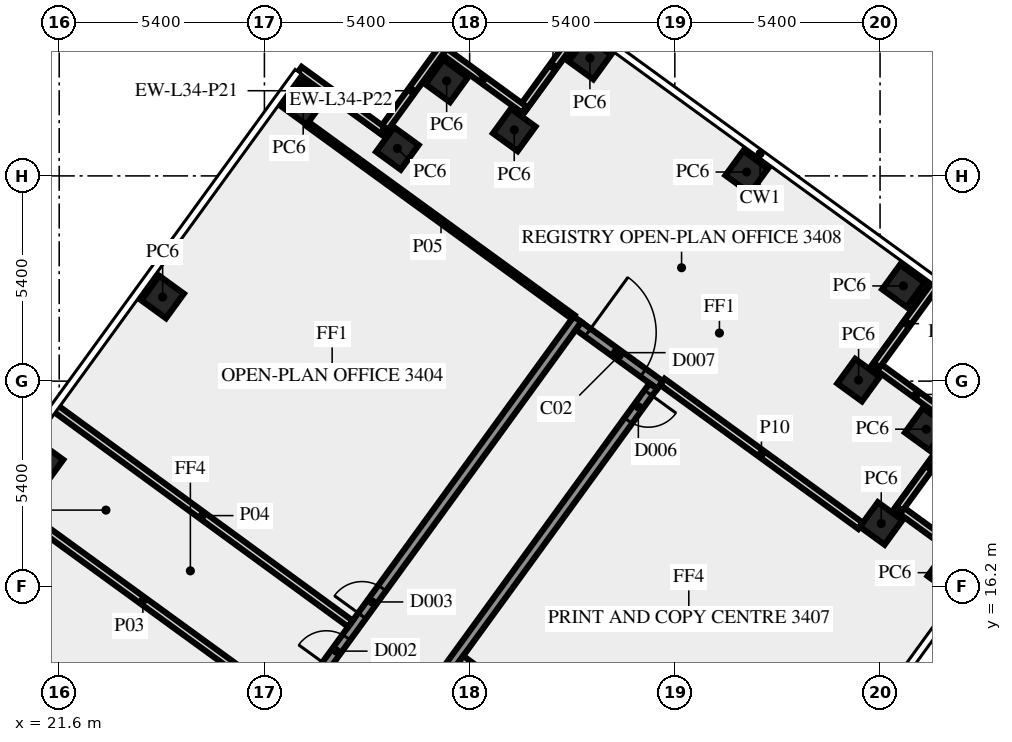
"""IFC4 building model, lengths in metres.
Left out: names, types, materials, properties, quantities, classifications, styles, units other than length and angle.
Written with IfcOpenShell. Run it as: python <this file> out.ifc"""

import sys

from ifc_helpers import new_model, si_unit, direction, frame, frame_2d, origin, origin_2d, place, context, subcontext, project, spatial, rectangle, extrude, element, fill, save


model = new_model("IFC4")
c1 = context("Model", 3, precision=1e-05, world=origin(), true_north=direction((0.0, 1.0)))
c2 = subcontext(c1, "Body", "Model", "MODEL_VIEW")
j1 = project(units=[si_unit("LENGTHUNIT", "METRE"), si_unit("PLANEANGLEUNIT", "RADIAN")], contexts=[c1])
p1 = place(None, origin())
s1 = spatial("IfcSite", under=j1, at=p1, CompositionType="ELEMENT")
p2 = place(p1, origin())
s2 = spatial("IfcBuilding", under=s1, at=p2, CompositionType="ELEMENT")
p3 = place(p2, frame((0.0, 0.0, 148.0)))
s3 = spatial("IfcBuildingStorey", under=s2, at=p3, CompositionType="ELEMENT", Elevation=148.0)
for number, where, z_axis, x_axis in (
    (1, (45.01, 16.56, 0.0), (0.0, 0.0, 1.0), (0.588, 0.809, 0.0)),
    (2, (43.231, 17.854, 0.0), (0.0, 0.0, 1.0), (0.588, 0.809, 0.0)),
    (3, (44.415, 20.335, 0.0), (0.0, 0.0, 1.0), (0.588, 0.809, 0.0)),
    (4, (42.635, 21.626, 0.0), (0.0, 0.0, 1.0), (-0.809, 0.588, 0.0)),
    (5, (43.815, 24.105, 0.0), (0.0, 0.0, 1.0), (-0.809, 0.588, 0.0)),
    (6, (39.691, 27.102, 0.0), (0.0, 0.0, 1.0), (-0.809, 0.588, 0.0)),
    (7, (35.565, 30.1, 0.0), (0.0, 0.0, 1.0), (-0.588, -0.809, 0.0)),
    (8, (33.574, 28.209, 0.0), (0.0, 0.0, 1.0), (-0.809, 0.588, 0.0)),
    (9, (31.795, 29.5, 0.0), (0.0, 0.0, 1.0), (-0.588, -0.809, 0.0)),
    (10, (30.499, 27.723, 0.0), (0.0, 0.0, 1.0), (-0.809, 0.588, 0.0)),
    (11, (28.02, 28.905, 0.0), (0.0, 0.0, 1.0), (-0.809, 0.588, 0.0)),
    (12, (24.321, 23.812, 0.0), (0.0, 0.0, 1.0), (-0.588, -0.809, 0.0)),
    (13, (21.147, 19.444, 0.0), (0.0, 0.0, 1.0), (-0.588, -0.809, 0.0)),
):
    element("IfcColumn", number, at=place(p3, frame(where, z_axis=z_axis, x_axis=x_axis)), inside=s3, PredefinedType="COLUMN", context=c2, shape_type="SweptSolid", body=[
        extrude(rectangle(XDim=0.8, YDim=0.8, at=origin_2d()), origin(), (0.0, 0.0, 1.0), 3.65),
    ])
for number, where, z_axis, x_axis in (
    (14, (45.842, 16.685, 0.0), (0.0, 0.0, 1.0), (-0.809, 0.588, 0.0)),
    (15, (43.709, 18.249, 0.0), (0.0, 0.0, 1.0), (0.588, 0.809, 0.0)),
    (16, (45.245, 20.456, 0.0), (0.0, 0.0, 1.0), (-0.809, 0.588, 0.0)),
    (17, (43.113, 22.02, 0.0), (0.0, 0.0, 1.0), (0.588, 0.809, 0.0)),
    (18, (35.388, 30.97, 0.0), (0.0, 0.0, 1.0), (-0.588, -0.809, 0.0)),
    (19, (33.838, 28.744, 0.0), (0.0, 0.0, 1.0), (-0.809, 0.588, 0.0)),
    (20, (31.67, 30.333, 0.0), (0.0, 0.0, 1.0), (-0.588, -0.809, 0.0)),
    (21, (30.106, 28.2, 0.0), (0.0, 0.0, 1.0), (-0.809, 0.588, 0.0)),
):
    element("IfcWall", number, at=place(p3, frame(where, z_axis=z_axis, x_axis=x_axis)), inside=s3, PredefinedType="SOLIDWALL", context=c2, shape_type="SweptSolid", body=[
        extrude(rectangle(XDim=2.7, YDim=0.2, at=frame_2d((1.35, 0.0))), origin(), (0.0, 0.0, 1.0), 3.65),
    ])
p4 = place(p3, frame((17.545, -1.125, 0.0), z_axis=(0.0, 0.0, 1.0), x_axis=(0.587786330937, 0.809016210693, 0.0)))
e22 = element("IfcWall", 22, at=p4, inside=s3, PredefinedType="SOLIDWALL", context=c2, shape_type="SweptSolid", body=[
    extrude(rectangle(XDim=30.103, YDim=0.25, at=frame_2d((15.052, 0.0))), origin(), (0.0, 0.0, 1.0), 3.65),
])
p5 = place(p4, frame((3.441, 0.0, 0.0)))
e23 = element("IfcOpeningElement", 23, at=p5, cuts=e22, PredefinedType="OPENING", context=c2, shape_type="SweptSolid", body=[
    extrude(rectangle(XDim=0.9, YDim=2.1, at=frame_2d((0.45, 1.05))), frame((0.0, 0.135, 0.0), z_axis=(0.0, -1.0, 0.0), x_axis=(1.0, 0.0, 0.0)), (0.0, 0.0, 1.0), 0.27),
])
p6 = place(p4, frame((20.457, 0.0, 0.0)))
e24 = element("IfcOpeningElement", 24, at=p6, cuts=e22, PredefinedType="OPENING", context=c2, shape_type="SweptSolid", body=[
    extrude(rectangle(XDim=0.9, YDim=2.1, at=frame_2d((0.45, 1.05))), frame((0.0, 0.135, 0.0), z_axis=(0.0, -1.0, 0.0), x_axis=(1.0, 0.0, 0.0)), (0.0, 0.0, 1.0), 0.27),
])
p7 = place(p4, frame((18.858, 0.0, 0.0)))
e25 = element("IfcOpeningElement", 25, at=p7, cuts=e22, PredefinedType="OPENING", context=c2, shape_type="SweptSolid", body=[
    extrude(rectangle(XDim=0.9, YDim=2.1, at=frame_2d((0.45, 1.05))), frame((0.0, 0.135, 0.0), z_axis=(0.0, -1.0, 0.0), x_axis=(1.0, 0.0, 0.0)), (0.0, 0.0, 1.0), 0.27),
])
p8 = place(p3, frame((35.267, 23.054, 0.0), z_axis=(0.0, 0.0, 1.0), x_axis=(0.809038743598, -0.587755315891, 0.0)))
e26 = element("IfcWall", 26, at=p8, inside=s3, PredefinedType="SOLIDWALL", context=c2, shape_type="SweptSolid", body=[
    extrude(rectangle(XDim=2.65, YDim=0.25, at=frame_2d((1.325, 0.0))), origin(), (0.0, 0.0, 1.0), 3.65),
])
p9 = place(p8, frame((0.3, 0.0, 0.0)))
e27 = element("IfcOpeningElement", 27, at=p9, cuts=e26, PredefinedType="OPENING", context=c2, shape_type="SweptSolid", body=[
    extrude(rectangle(XDim=1.8, YDim=2.1, at=frame_2d((0.9, 1.05))), frame((0.0, 0.135, 0.0), z_axis=(0.0, -1.0, 0.0), x_axis=(1.0, 0.0, 0.0)), (0.0, 0.0, 1.0), 0.27),
])
p10 = place(p3, frame((37.236, 21.469, 0.0), z_axis=(0.0, 0.0, 1.0), x_axis=(-0.58778344073, -0.809018310549, 0.0)))
e28 = element("IfcWall", 28, at=p10, inside=s3, PredefinedType="SOLIDWALL", context=c2, shape_type="SweptSolid", body=[
    extrude(rectangle(XDim=28.42, YDim=0.25, at=frame_2d((14.21, 0.0))), origin(), (0.0, 0.0, 1.0), 3.65),
])
p11 = place(p10, frame((26.988, 0.0, 0.0)))
e29 = element("IfcOpeningElement", 29, at=p11, cuts=e28, PredefinedType="OPENING", context=c2, shape_type="SweptSolid", body=[
    extrude(rectangle(XDim=0.9, YDim=2.1, at=frame_2d((0.45, 1.05))), frame((0.0, 0.135, 0.0), z_axis=(0.0, -1.0, 0.0), x_axis=(1.0, 0.0, 0.0)), (0.0, 0.0, 1.0), 0.27),
])
p12 = place(p10, frame((0.224, 0.0, 0.0)))
e30 = element("IfcOpeningElement", 30, at=p12, cuts=e28, PredefinedType="OPENING", context=c2, shape_type="SweptSolid", body=[
    extrude(rectangle(XDim=0.9, YDim=2.1, at=frame_2d((0.45, 1.05))), frame((0.0, 0.135, 0.0), z_axis=(0.0, -1.0, 0.0), x_axis=(1.0, 0.0, 0.0)), (0.0, 0.0, 1.0), 0.27),
])
p13 = place(p10, frame((9.155, 0.0, 0.0)))
e31 = element("IfcOpeningElement", 31, at=p13, cuts=e28, PredefinedType="OPENING", context=c2, shape_type="SweptSolid", body=[
    extrude(rectangle(XDim=0.9, YDim=2.1, at=frame_2d((0.45, 1.05))), frame((0.0, 0.135, 0.0), z_axis=(0.0, -1.0, 0.0), x_axis=(1.0, 0.0, 0.0)), (0.0, 0.0, 1.0), 0.27),
])
p14 = place(p3, frame((27.664, 13.016, 0.0), z_axis=(0.0, 0.0, 1.0), x_axis=(-0.80900684162, 0.587799226107, 0.0)))
e32 = element("IfcWall", 32, at=p14, inside=s3, PredefinedType="SOLIDWALL", context=c2, shape_type="SweptSolid", body=[
    extrude(rectangle(XDim=9.55, YDim=0.2, at=frame_2d((4.775, 0.0))), origin(), (0.0, 0.0, 1.0), 2.85),
])
p15 = place(p3, frame((21.469, 20.908, 0.0), z_axis=(0.0, 0.0, 1.0), x_axis=(0.807593618158, -0.589739389824, 0.0)))
e33 = element("IfcWall", 33, at=p15, inside=s3, PredefinedType="SOLIDWALL", context=c2, shape_type="SweptSolid", body=[
    extrude(rectangle(XDim=9.651, YDim=0.2, at=frame_2d((4.826, 0.0))), origin(), (0.0, 0.0, 1.0), 2.85),
])
p16 = place(p3, frame((35.126, 23.286, 0.0), z_axis=(0.0, 0.0, 1.0), x_axis=(-0.809030614944, 0.58776650473, 0.0)))
e34 = element("IfcWall", 34, at=p16, inside=s3, PredefinedType="PARTITIONING", context=c2, shape_type="SweptSolid", body=[
    extrude(rectangle(XDim=8.6, YDim=0.12, at=frame_2d((4.3, 0.0))), origin(), (0.0, 0.0, 1.0), 3.65),
])
p17 = place(p3, frame((42.686, 17.794, 0.0), z_axis=(0.0, 0.0, 1.0), x_axis=(-0.809017755079, 0.587784205272, 0.0)))
e35 = element("IfcWall", 35, at=p17, inside=s3, PredefinedType="SOLIDWALL", context=c2, shape_type="SweptSolid", body=[
    extrude(rectangle(XDim=6.445, YDim=0.2, at=frame_2d((3.222, 0.0))), origin(), (0.0, 0.0, 1.0), 3.65),
])
p18 = place(p3, frame((32.174, 14.288, 0.0), z_axis=(0.0, 0.0, 1.0), x_axis=(0.807664588563, -0.589642190131, 0.0)))
e36 = element("IfcWall", 36, at=p18, inside=s3, PredefinedType="SOLIDWALL", context=c2, shape_type="SweptSolid", body=[
    extrude(rectangle(XDim=9.55, YDim=0.2, at=frame_2d((4.775, 0.0))), origin(), (0.0, 0.0, 1.0), 2.85),
])
p19 = place(p6, origin())
e37 = element("IfcDoor", 37, at=p19, inside=s3, OperationType="SINGLE_SWING_LEFT", PredefinedType="DOOR", context=c2, shape_type="SweptSolid", body=[
    extrude(rectangle(XDim=0.9, YDim=2.1, at=frame_2d((0.45, 1.05))), frame((0.0, 0.025, 0.0), z_axis=(0.0, -1.0, 0.0), x_axis=(1.0, 0.0, 0.0)), (0.0, 0.0, 1.0), 0.05),
])
fill(e24, e37)
p20 = place(p7, origin())
e38 = element("IfcDoor", 38, at=p20, inside=s3, OperationType="SINGLE_SWING_RIGHT", PredefinedType="DOOR", context=c2, shape_type="SweptSolid", body=[
    extrude(rectangle(XDim=0.9, YDim=2.1, at=frame_2d((0.45, 1.05))), frame((0.0, 0.025, 0.0), z_axis=(0.0, -1.0, 0.0), x_axis=(1.0, 0.0, 0.0)), (0.0, 0.0, 1.0), 0.05),
])
fill(e25, e38)
p21 = place(p12, origin())
e39 = element("IfcDoor", 39, at=p21, inside=s3, OperationType="SINGLE_SWING_LEFT", PredefinedType="DOOR", context=c2, shape_type="SweptSolid", body=[
    extrude(rectangle(XDim=0.9, YDim=2.1, at=frame_2d((0.45, 1.05))), frame((0.0, 0.025, 0.0), z_axis=(0.0, -1.0, 0.0), x_axis=(1.0, 0.0, 0.0)), (0.0, 0.0, 1.0), 0.05),
])
fill(e30, e39)
p22 = place(p9, origin())
e40 = element("IfcDoor", 40, at=p22, inside=s3, OperationType="DOUBLE_DOOR_SINGLE_SWING", PredefinedType="DOOR", context=c2, shape_type="SweptSolid", body=[
    extrude(rectangle(XDim=1.8, YDim=2.1, at=frame_2d((0.9, 1.05))), frame((0.0, 0.025, 0.0), z_axis=(0.0, -1.0, 0.0), x_axis=(1.0, 0.0, 0.0)), (0.0, 0.0, 1.0), 0.05),
])
fill(e27, e40)
save(model, sys.argv[1])
